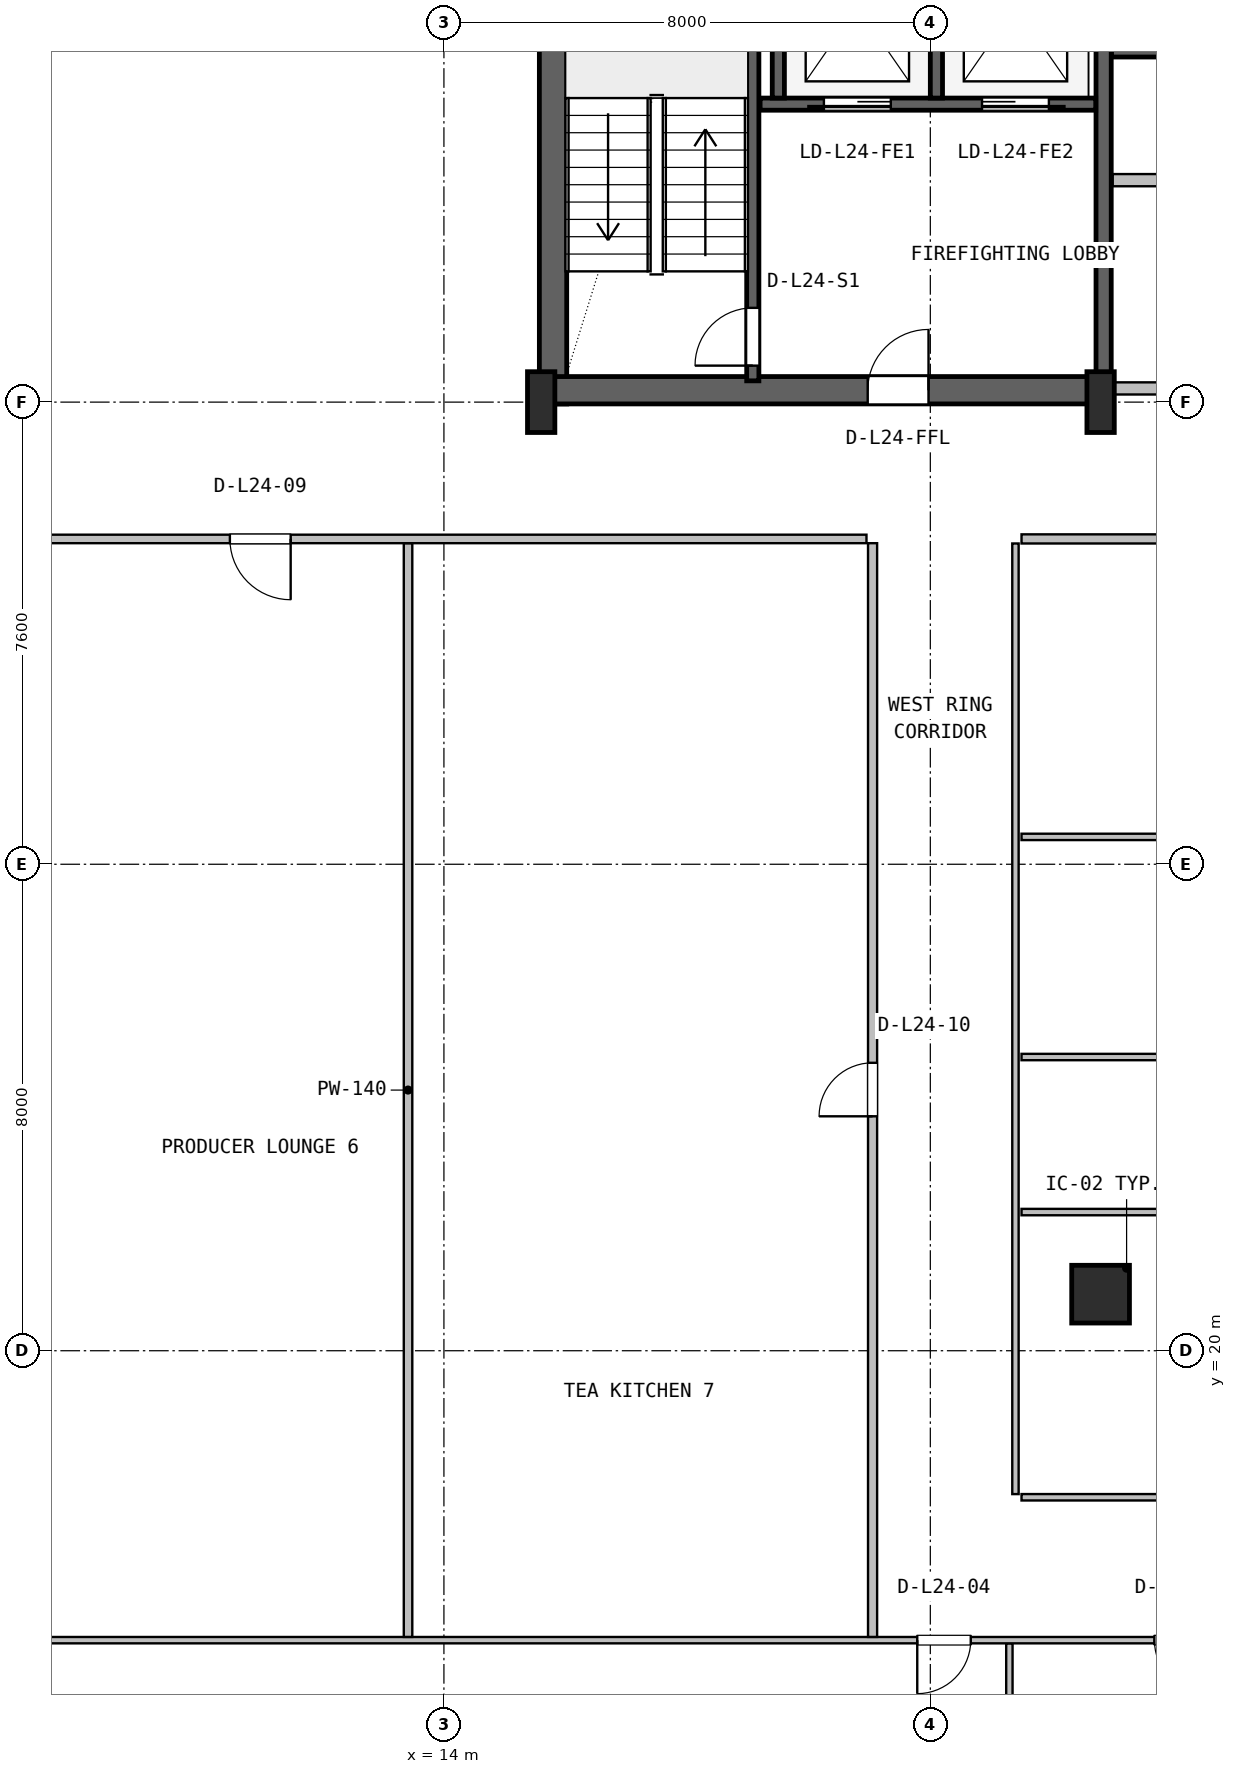
"""IFC4 building model, lengths in metres.
Left out: names, types, materials, properties, quantities, classifications, styles, units other than length and angle.
Written with IfcOpenShell. Run it as: python <this file> out.ifc"""

import sys

from ifc_helpers import new_model, si_unit, direction, frame, frame_2d, origin, origin_2d, place, context, subcontext, project, spatial, rectangle, i_section, extrude, source, transform, mapped, element, fill, save


model = new_model("IFC4")
c1 = context("Model", 3, precision=1e-05, world=origin(), true_north=direction((0.0, 1.0)))
c2 = subcontext(c1, "Body", "Model", "MODEL_VIEW")
j1 = project(units=[si_unit("LENGTHUNIT", "METRE"), si_unit("PLANEANGLEUNIT", "RADIAN")], contexts=[c1])
p1 = place(None, origin())
s1 = spatial("IfcSite", under=j1, at=p1, CompositionType="ELEMENT")
p2 = place(p1, origin())
s2 = spatial("IfcBuilding", under=s1, at=p2, CompositionType="ELEMENT")
p3 = place(p2, frame((0.0, 0.0, 103.0)))
s3 = spatial("IfcBuildingStorey", under=s2, at=p3, CompositionType="ELEMENT", Elevation=103.0)
p4 = place(p3, frame((15.795, 35.57, 0.0), z_axis=(0.0, 0.0, 1.0), x_axis=(0.0, 1.0, 0.0)))
e1 = element("IfcWall", 1, at=p4, inside=s3, PredefinedType="SHEAR", context=c2, shape_type="SweptSolid", body=[
    extrude(rectangle(XDim=11.23, YDim=0.45, at=frame_2d((5.615, 0.0))), origin(), (0.0, 0.0, 1.0), 3.55),
])
p5 = place(p3, frame((15.57, 35.795, 0.0), z_axis=(0.0, 0.0, 1.0), x_axis=(1.0, 0.0, 0.0)))
e2 = element("IfcWall", 2, at=p5, inside=s3, PredefinedType="SHEAR", context=c2, shape_type="SweptSolid", body=[
    extrude(rectangle(XDim=9.23, YDim=0.45, at=frame_2d((4.615, 0.0))), origin(), (0.0, 0.0, 1.0), 3.55),
])
p6 = place(p5, frame((5.4, 0.0, 0.0)))
e3 = element("IfcOpeningElement", 3, at=p6, cuts=e2, PredefinedType="OPENING", context=c2, shape_type="SweptSolid", body=[
    extrude(rectangle(XDim=1.0, YDim=2.1, at=frame_2d((0.5, 1.05))), frame((0.0, 0.235, 0.0), z_axis=(0.0, -1.0, 0.0), x_axis=(1.0, 0.0, 0.0)), (0.0, 0.0, 1.0), 0.47),
])
m1 = source(origin(), c2, "Body", "SweptSolid", [
    extrude(i_section(OverallWidth=0.45, OverallDepth=1.0, WebThickness=0.016, FlangeThickness=0.03, FilletRadius=0.016, at=origin_2d()), origin(), (0.0, 0.0, 1.0), 3.8),
])
for number, where, z_axis, x_axis in (
    (4, (15.6, 35.6, 0.0), (0.0, 0.0, 1.0), (1.0, 0.0, 0.0)),
    (5, (24.8, 35.6, 0.0), (0.0, 0.0, 1.0), (1.0, 0.0, 0.0)),
):
    element("IfcColumn", number, at=place(p3, frame(where, z_axis=z_axis, x_axis=x_axis)), inside=s3, PredefinedType="COLUMN", context=c2, shape_type="MappedRepresentation", body=[
        mapped(m1, transform((0.0, 0.0, 0.0), x_axis=(1.0, 0.0, 0.0), y_axis=(0.0, 1.0, 0.0), z_axis=(0.0, 0.0, 1.0), scale=1.0)),
    ])
m2 = source(origin(), c2, "Body", "SweptSolid", [
    extrude(rectangle(XDim=0.95, YDim=0.95, at=origin_2d()), origin(), (0.0, 0.0, 1.0), 3.8),
])
p7 = place(p3, frame((24.8, 20.93, 0.0), z_axis=(0.0, 0.0, 1.0), x_axis=(1.0, 0.0, 0.0)))
e6 = element("IfcColumn", 6, at=p7, inside=s3, PredefinedType="COLUMN", context=c2, shape_type="MappedRepresentation", body=[
    mapped(m2, transform((0.0, 0.0, 0.0), x_axis=(1.0, 0.0, 0.0), y_axis=(0.0, 1.0, 0.0), z_axis=(0.0, 0.0, 1.0), scale=1.0)),
])
p8 = place(p3, frame((19.08, 35.95, 0.0), z_axis=(0.0, 0.0, 1.0), x_axis=(0.0, 1.0, 0.0)))
e7 = element("IfcWall", 7, at=p8, inside=s3, PredefinedType="SHEAR", context=c2, shape_type="SweptSolid", body=[
    extrude(rectangle(XDim=9.65, YDim=0.2, at=frame_2d((4.825, 0.0))), origin(), (0.0, 0.0, 1.0), 3.55),
])
p9 = place(p8, frame((0.25, 0.0, 0.0)))
e8 = element("IfcOpeningElement", 8, at=p9, cuts=e7, PredefinedType="OPENING", context=c2, shape_type="SweptSolid", body=[
    extrude(rectangle(XDim=0.95, YDim=2.1, at=frame_2d((0.475, 1.05))), frame((0.0, 0.11, 0.0), z_axis=(0.0, -1.0, 0.0), x_axis=(1.0, 0.0, 0.0)), (0.0, 0.0, 1.0), 0.22),
])
p10 = place(p3, frame((24.85, 36.05, 0.0), z_axis=(0.0, 0.0, 1.0), x_axis=(0.0, 1.0, 0.0)))
e9 = element("IfcWall", 9, at=p10, inside=s3, PredefinedType="SHEAR", context=c2, shape_type="SweptSolid", body=[
    extrude(rectangle(XDim=10.45, YDim=0.25, at=frame_2d((5.225, 0.0))), origin(), (0.0, 0.0, 1.0), 3.55),
])
p11 = place(p3, frame((19.2, 40.5, 0.0), z_axis=(0.0, 0.0, 1.0), x_axis=(1.0, 0.0, 0.0)))
e10 = element("IfcWall", 10, at=p11, inside=s3, PredefinedType="SHEAR", context=c2, shape_type="SweptSolid", body=[
    extrude(rectangle(XDim=5.52, YDim=0.2, at=frame_2d((2.76, 0.0))), origin(), (0.0, 0.0, 1.0), 3.55),
])
p12 = place(p11, frame((1.05, 0.0, 0.0)))
e11 = element("IfcOpeningElement", 11, at=p12, cuts=e10, PredefinedType="OPENING", context=c2, shape_type="SweptSolid", body=[
    extrude(rectangle(XDim=1.1, YDim=2.18, at=frame_2d((0.55, 1.09))), frame((0.0, 0.11, 0.0), z_axis=(0.0, -1.0, 0.0), x_axis=(1.0, 0.0, 0.0)), (0.0, 0.0, 1.0), 0.22),
])
p13 = place(p11, frame((3.65, 0.0, 0.0)))
e12 = element("IfcOpeningElement", 12, at=p13, cuts=e10, PredefinedType="OPENING", context=c2, shape_type="SweptSolid", body=[
    extrude(rectangle(XDim=1.1, YDim=2.18, at=frame_2d((0.55, 1.09))), frame((0.0, 0.11, 0.0), z_axis=(0.0, -1.0, 0.0), x_axis=(1.0, 0.0, 0.0)), (0.0, 0.0, 1.0), 0.22),
])
p14 = place(p3, frame((22.1, 40.6, 0.0), z_axis=(0.0, 0.0, 1.0), x_axis=(0.0, 1.0, 0.0)))
e13 = element("IfcWall", 13, at=p14, inside=s3, PredefinedType="SHEAR", context=c2, shape_type="SweptSolid", body=[
    extrude(rectangle(XDim=3.0, YDim=0.2, at=frame_2d((1.5, 0.0))), origin(), (0.0, 0.0, 1.0), 3.55),
])
p15 = place(p3, frame((19.5, 40.6, 0.0), z_axis=(0.0, 0.0, 1.0), x_axis=(0.0, 1.0, 0.0)))
e14 = element("IfcWall", 14, at=p15, inside=s3, PredefinedType="SHEAR", context=c2, shape_type="SweptSolid", body=[
    extrude(rectangle(XDim=5.95, YDim=0.2, at=frame_2d((2.975, 0.0))), origin(), (0.0, 0.0, 1.0), 3.55),
])
p16 = place(p3, frame((24.98, 41.4, 0.0), z_axis=(0.0, 0.0, 1.0), x_axis=(1.0, 0.0, 0.0)))
e15 = element("IfcWall", 15, at=p16, inside=s3, PredefinedType="SHEAR", context=c2, shape_type="SweptSolid", body=[
    extrude(rectangle(XDim=23.82, YDim=0.25, at=frame_2d((11.91, 0.0))), origin(), (0.0, 0.0, 1.0), 3.55),
])
p17 = place(p16, frame((8.87, 0.0, 0.0)))
e16 = element("IfcOpeningElement", 16, at=p17, cuts=e15, PredefinedType="OPENING", context=c2, shape_type="SweptSolid", body=[
    extrude(rectangle(XDim=1.1, YDim=2.18, at=frame_2d((0.55, 1.09))), frame((0.0, 0.135, 0.0), z_axis=(0.0, -1.0, 0.0), x_axis=(1.0, 0.0, 0.0)), (0.0, 0.0, 1.0), 0.27),
])
p18 = place(p16, frame((11.47, 0.0, 0.0)))
e17 = element("IfcOpeningElement", 17, at=p18, cuts=e15, PredefinedType="OPENING", context=c2, shape_type="SweptSolid", body=[
    extrude(rectangle(XDim=1.1, YDim=2.18, at=frame_2d((0.55, 1.09))), frame((0.0, 0.135, 0.0), z_axis=(0.0, -1.0, 0.0), x_axis=(1.0, 0.0, 0.0)), (0.0, 0.0, 1.0), 0.27),
])
p19 = place(p16, frame((14.07, 0.0, 0.0)))
e18 = element("IfcOpeningElement", 18, at=p19, cuts=e15, PredefinedType="OPENING", context=c2, shape_type="SweptSolid", body=[
    extrude(rectangle(XDim=1.1, YDim=2.18, at=frame_2d((0.55, 1.09))), frame((0.0, 0.135, 0.0), z_axis=(0.0, -1.0, 0.0), x_axis=(1.0, 0.0, 0.0)), (0.0, 0.0, 1.0), 0.27),
])
p20 = place(p3, frame((25.0, 35.825, 0.0), z_axis=(0.0, 0.0, 1.0), x_axis=(1.0, 0.0, 0.0)))
e19 = element("IfcWall", 19, at=p20, inside=s3, PredefinedType="PLUMBINGWALL", context=c2, shape_type="SweptSolid", body=[
    extrude(rectangle(XDim=9.75, YDim=0.2, at=frame_2d((4.875, 0.0))), origin(), (0.0, 0.0, 1.0), 2.325),
])
p21 = place(p3, frame((25.0, 39.25, 0.0), z_axis=(0.0, 0.0, 1.0), x_axis=(1.0, 0.0, 0.0)))
e20 = element("IfcWall", 20, at=p21, inside=s3, PredefinedType="PLUMBINGWALL", context=c2, shape_type="SweptSolid", body=[
    extrude(rectangle(XDim=9.75, YDim=0.2, at=frame_2d((4.875, 0.0))), origin(), (0.0, 0.0, 1.0), 3.53),
])
p22 = place(p21, frame((1.75, 0.0, 0.0)))
e21 = element("IfcOpeningElement", 21, at=p22, cuts=e20, PredefinedType="OPENING", context=c2, shape_type="SweptSolid", body=[
    extrude(rectangle(XDim=0.9, YDim=2.06, at=frame_2d((0.45, 1.03))), frame((0.0, 0.11, 0.0), z_axis=(0.0, -1.0, 0.0), x_axis=(1.0, 0.0, 0.0)), (0.0, 0.0, 1.0), 0.22),
])
p23 = place(p21, frame((6.725, 0.0, 0.0)))
e22 = element("IfcOpeningElement", 22, at=p23, cuts=e20, PredefinedType="OPENING", context=c2, shape_type="SweptSolid", body=[
    extrude(rectangle(XDim=0.9, YDim=2.06, at=frame_2d((0.45, 1.03))), frame((0.0, 0.11, 0.0), z_axis=(0.0, -1.0, 0.0), x_axis=(1.0, 0.0, 0.0)), (0.0, 0.0, 1.0), 0.22),
])
p24 = place(p3, frame((23.3, 4.38, 0.0), z_axis=(0.0, 0.0, 1.0), x_axis=(0.0, 1.0, 0.0)))
e23 = element("IfcWall", 23, at=p24, inside=s3, PredefinedType="PARTITIONING", context=c2, shape_type="SweptSolid", body=[
    extrude(rectangle(XDim=10.808, YDim=0.105, at=frame_2d((5.404, 0.0))), origin(), (0.0, 0.0, 1.0), 3.108),
])
p25 = place(p3, frame((4.68, 15.24, 0.0), z_axis=(0.0, 0.0, 1.0), x_axis=(1.0, 0.0, 0.0)))
e24 = element("IfcWall", 24, at=p25, inside=s3, PredefinedType="PARTITIONING", context=c2, shape_type="SweptSolid", body=[
    extrude(rectangle(XDim=58.64, YDim=0.105, at=frame_2d((29.32, 0.0))), origin(), (0.0, 0.0, 1.0), 2.83),
])
p26 = place(p25, frame((17.105, 0.0, 0.0)))
e25 = element("IfcOpeningElement", 25, at=p26, cuts=e24, PredefinedType="OPENING", context=c2, shape_type="SweptSolid", body=[
    extrude(rectangle(XDim=0.88, YDim=2.06, at=frame_2d((0.44, 1.03))), frame((0.0, 0.062, 0.0), z_axis=(0.0, -1.0, 0.0), x_axis=(1.0, 0.0, 0.0)), (0.0, 0.0, 1.0), 0.125),
])
p27 = place(p25, frame((21.005, 0.0, 0.0)))
e26 = element("IfcOpeningElement", 26, at=p27, cuts=e24, PredefinedType="OPENING", context=c2, shape_type="SweptSolid", body=[
    extrude(rectangle(XDim=0.88, YDim=2.06, at=frame_2d((0.44, 1.03))), frame((0.0, 0.062, 0.0), z_axis=(0.0, -1.0, 0.0), x_axis=(1.0, 0.0, 0.0)), (0.0, 0.0, 1.0), 0.125),
])
p28 = place(p25, frame((27.42, 0.0, 0.0)))
e27 = element("IfcOpeningElement", 27, at=p28, cuts=e24, PredefinedType="OPENING", context=c2, shape_type="SweptSolid", body=[
    extrude(rectangle(XDim=0.88, YDim=2.06, at=frame_2d((0.44, 1.03))), frame((0.0, 0.062, 0.0), z_axis=(0.0, -1.0, 0.0), x_axis=(1.0, 0.0, 0.0)), (0.0, 0.0, 1.0), 0.125),
])
p29 = place(p25, frame((35.845, 0.0, 0.0)))
e28 = element("IfcOpeningElement", 28, at=p29, cuts=e24, PredefinedType="OPENING", context=c2, shape_type="SweptSolid", body=[
    extrude(rectangle(XDim=0.92, YDim=2.08, at=frame_2d((0.46, 1.04))), frame((0.0, 0.062, 0.0), z_axis=(0.0, -1.0, 0.0), x_axis=(1.0, 0.0, 0.0)), (0.0, 0.0, 1.0), 0.125),
])
p30 = place(p25, frame((41.71, 0.0, 0.0)))
e29 = element("IfcOpeningElement", 29, at=p30, cuts=e24, PredefinedType="OPENING", context=c2, shape_type="SweptSolid", body=[
    extrude(rectangle(XDim=1.05, YDim=2.1, at=frame_2d((0.525, 1.05))), frame((0.0, 0.062, 0.0), z_axis=(0.0, -1.0, 0.0), x_axis=(1.0, 0.0, 0.0)), (0.0, 0.0, 1.0), 0.125),
])
p31 = place(p3, frame((13.41, 15.293, 0.0), z_axis=(0.0, 0.0, 1.0), x_axis=(0.0, 1.0, 0.0)))
e30 = element("IfcWall", 30, at=p31, inside=s3, PredefinedType="PARTITIONING", context=c2, shape_type="SweptSolid", body=[
    extrude(rectangle(XDim=17.987, YDim=0.14, at=frame_2d((8.994, 0.0))), origin(), (0.0, 0.0, 1.0), 3.222),
])
p32 = place(p3, frame((4.68, 33.35, 0.0), z_axis=(0.0, 0.0, 1.0), x_axis=(1.0, 0.0, 0.0)))
e31 = element("IfcWall", 31, at=p32, inside=s3, PredefinedType="PARTITIONING", context=c2, shape_type="SweptSolid", body=[
    extrude(rectangle(XDim=16.27, YDim=0.14, at=frame_2d((8.135, 0.0))), origin(), (0.0, 0.0, 1.0), 3.108),
])
p33 = place(p32, frame((5.8, 0.0, 0.0)))
e32 = element("IfcOpeningElement", 32, at=p33, cuts=e31, PredefinedType="OPENING", context=c2, shape_type="SweptSolid", body=[
    extrude(rectangle(XDim=1.0, YDim=2.1, at=frame_2d((0.5, 1.05))), frame((0.0, 0.08, 0.0), z_axis=(0.0, -1.0, 0.0), x_axis=(1.0, 0.0, 0.0)), (0.0, 0.0, 1.0), 0.16),
])
p34 = place(p3, frame((21.05, 15.293, 0.0), z_axis=(0.0, 0.0, 1.0), x_axis=(0.0, 1.0, 0.0)))
e33 = element("IfcWall", 33, at=p34, inside=s3, PredefinedType="PARTITIONING", context=c2, shape_type="SweptSolid", body=[
    extrude(rectangle(XDim=17.987, YDim=0.15, at=frame_2d((8.994, 0.0))), origin(), (0.0, 0.0, 1.0), 3.222),
])
p35 = place(p34, frame((8.562, 0.0, 0.0)))
e34 = element("IfcOpeningElement", 34, at=p35, cuts=e33, PredefinedType="OPENING", context=c2, shape_type="SweptSolid", body=[
    extrude(rectangle(XDim=0.88, YDim=2.06, at=frame_2d((0.44, 1.03))), frame((0.0, 0.085, 0.0), z_axis=(0.0, -1.0, 0.0), x_axis=(1.0, 0.0, 0.0)), (0.0, 0.0, 1.0), 0.17),
])
p36 = place(p3, frame((23.5, 17.59, 0.0), z_axis=(0.0, 0.0, 1.0), x_axis=(1.0, 0.0, 0.0)))
e35 = element("IfcWall", 35, at=p36, inside=s3, PredefinedType="PARTITIONING", context=c2, shape_type="SweptSolid", body=[
    extrude(rectangle(XDim=22.14, YDim=0.105, at=frame_2d((11.07, 0.0))), origin(), (0.0, 0.0, 1.0), 2.83),
])
p37 = place(p36, frame((10.63, 0.0, 0.0)))
e36 = element("IfcOpeningElement", 36, at=p37, cuts=e35, PredefinedType="OPENING", context=c2, shape_type="SweptSolid", body=[
    extrude(rectangle(XDim=0.88, YDim=2.06, at=frame_2d((0.44, 1.03))), frame((0.0, 0.062, 0.0), z_axis=(0.0, -1.0, 0.0), x_axis=(1.0, 0.0, 0.0)), (0.0, 0.0, 1.0), 0.125),
])
p38 = place(p3, frame((23.5, 22.28, 0.0), z_axis=(0.0, 0.0, 1.0), x_axis=(1.0, 0.0, 0.0)))
e37 = element("IfcWall", 37, at=p38, inside=s3, PredefinedType="PARTITIONING", context=c2, shape_type="SweptSolid", body=[
    extrude(rectangle(XDim=22.14, YDim=0.105, at=frame_2d((11.07, 0.0))), origin(), (0.0, 0.0, 1.0), 2.83),
])
p39 = place(p3, frame((23.4, 17.642, 0.0), z_axis=(0.0, 0.0, 1.0), x_axis=(0.0, 1.0, 0.0)))
e38 = element("IfcWall", 38, at=p39, inside=s3, PredefinedType="PARTITIONING", context=c2, shape_type="SweptSolid", body=[
    extrude(rectangle(XDim=15.633, YDim=0.105, at=frame_2d((7.816, 0.0))), origin(), (0.0, 0.0, 1.0), 3.222),
])
for number, where, z_axis, x_axis in (
    (39, (23.5, 24.83, 0.0), (0.0, 0.0, 1.0), (1.0, 0.0, 0.0)),
    (40, (23.5, 28.45, 0.0), (0.0, 0.0, 1.0), (1.0, 0.0, 0.0)),
):
    element("IfcWall", number, at=place(p3, frame(where, z_axis=z_axis, x_axis=x_axis)), inside=s3, PredefinedType="PARTITIONING", context=c2, shape_type="SweptSolid", body=[
        extrude(rectangle(XDim=22.14, YDim=0.105, at=frame_2d((11.07, 0.0))), origin(), (0.0, 0.0, 1.0), 2.83),
    ])
p40 = place(p3, frame((23.5, 33.35, 0.0), z_axis=(0.0, 0.0, 1.0), x_axis=(1.0, 0.0, 0.0)))
e41 = element("IfcWall", 41, at=p40, inside=s3, PredefinedType="PARTITIONING", context=c2, shape_type="SweptSolid", body=[
    extrude(rectangle(XDim=22.14, YDim=0.15, at=frame_2d((11.07, 0.0))), origin(), (0.0, 0.0, 1.0), 2.83),
])
p41 = place(p40, frame((10.61, 0.0, 0.0)))
e42 = element("IfcOpeningElement", 42, at=p41, cuts=e41, PredefinedType="OPENING", context=c2, shape_type="SweptSolid", body=[
    extrude(rectangle(XDim=0.92, YDim=2.08, at=frame_2d((0.46, 1.04))), frame((0.0, 0.085, 0.0), z_axis=(0.0, -1.0, 0.0), x_axis=(1.0, 0.0, 0.0)), (0.0, 0.0, 1.0), 0.17),
])
m3 = source(origin(), c2, "Body", "SweptSolid", [
    extrude(rectangle(XDim=0.95, YDim=2.1, at=frame_2d((0.475, 1.05))), frame((0.0, 0.025, 0.0), z_axis=(0.0, -1.0, 0.0), x_axis=(1.0, 0.0, 0.0)), (0.0, 0.0, 1.0), 0.05),
])
p42 = place(p9, origin())
e43 = element("IfcDoor", 43, at=p42, inside=s3, OperationType="SINGLE_SWING_LEFT", PredefinedType="DOOR", context=c2, shape_type="MappedRepresentation", body=[
    mapped(m3, transform((0.0, 0.0, 0.0), x_axis=(1.0, 0.0, 0.0), y_axis=(0.0, 1.0, 0.0), z_axis=(0.0, 0.0, 1.0), scale=1.0)),
])
fill(e8, e43)
m4 = source(origin(), c2, "Body", "SweptSolid", [
    extrude(rectangle(XDim=1.0, YDim=2.1, at=frame_2d((0.5, 1.05))), frame((0.0, 0.025, 0.0), z_axis=(0.0, -1.0, 0.0), x_axis=(1.0, 0.0, 0.0)), (0.0, 0.0, 1.0), 0.05),
])
p43 = place(p6, origin())
e44 = element("IfcDoor", 44, at=p43, inside=s3, OperationType="SINGLE_SWING_RIGHT", PredefinedType="DOOR", context=c2, shape_type="MappedRepresentation", body=[
    mapped(m4, transform((0.0, 0.0, 0.0), x_axis=(1.0, 0.0, 0.0), y_axis=(0.0, 1.0, 0.0), z_axis=(0.0, 0.0, 1.0), scale=1.0)),
])
fill(e3, e44)
m5 = source(origin(), c2, "Body", "SweptSolid", [
    extrude(rectangle(XDim=1.1, YDim=2.18, at=frame_2d((0.55, 1.09))), frame((0.0, 0.025, 0.0), z_axis=(0.0, -1.0, 0.0), x_axis=(1.0, 0.0, 0.0)), (0.0, 0.0, 1.0), 0.05),
])
p44 = place(p12, frame((1.1, 0.0, 0.0), z_axis=(0.0, 0.0, 1.0), x_axis=(-1.0, 0.0, 0.0)))
e45 = element("IfcDoor", 45, at=p44, inside=s3, OperationType="SLIDING_TO_LEFT", PredefinedType="DOOR", context=c2, shape_type="MappedRepresentation", body=[
    mapped(m5, transform((0.0, 0.0, 0.0), x_axis=(1.0, 0.0, 0.0), y_axis=(0.0, 1.0, 0.0), z_axis=(0.0, 0.0, 1.0), scale=1.0)),
])
fill(e11, e45)
p45 = place(p13, frame((1.1, 0.0, 0.0), z_axis=(0.0, 0.0, 1.0), x_axis=(-1.0, 0.0, 0.0)))
e46 = element("IfcDoor", 46, at=p45, inside=s3, OperationType="SLIDING_TO_RIGHT", PredefinedType="DOOR", context=c2, shape_type="MappedRepresentation", body=[
    mapped(m5, transform((0.0, 0.0, 0.0), x_axis=(1.0, 0.0, 0.0), y_axis=(0.0, 1.0, 0.0), z_axis=(0.0, 0.0, 1.0), scale=1.0)),
])
fill(e12, e46)
m6 = source(origin(), c2, "Body", "SweptSolid", [
    extrude(rectangle(XDim=0.88, YDim=2.06, at=frame_2d((0.44, 1.03))), frame((0.0, 0.025, 0.0), z_axis=(0.0, -1.0, 0.0), x_axis=(1.0, 0.0, 0.0)), (0.0, 0.0, 1.0), 0.05),
])
p46 = place(p26, frame((0.88, 0.0, 0.0), z_axis=(0.0, 0.0, 1.0), x_axis=(-1.0, 0.0, 0.0)))
e47 = element("IfcDoor", 47, at=p46, inside=s3, OperationType="SINGLE_SWING_LEFT", PredefinedType="DOOR", context=c2, shape_type="MappedRepresentation", body=[
    mapped(m6, transform((0.0, 0.0, 0.0), x_axis=(1.0, 0.0, 0.0), y_axis=(0.0, 1.0, 0.0), z_axis=(0.0, 0.0, 1.0), scale=1.0)),
])
fill(e25, e47)
p47 = place(p27, frame((0.88, 0.0, 0.0), z_axis=(0.0, 0.0, 1.0), x_axis=(-1.0, 0.0, 0.0)))
e48 = element("IfcDoor", 48, at=p47, inside=s3, OperationType="SINGLE_SWING_RIGHT", PredefinedType="DOOR", context=c2, shape_type="MappedRepresentation", body=[
    mapped(m6, transform((0.0, 0.0, 0.0), x_axis=(1.0, 0.0, 0.0), y_axis=(0.0, 1.0, 0.0), z_axis=(0.0, 0.0, 1.0), scale=1.0)),
])
fill(e26, e48)
m7 = source(origin(), c2, "Body", "SweptSolid", [
    extrude(rectangle(XDim=1.0, YDim=2.1, at=frame_2d((0.5, 1.05))), frame((0.0, 0.025, 0.0), z_axis=(0.0, -1.0, 0.0), x_axis=(1.0, 0.0, 0.0)), (0.0, 0.0, 1.0), 0.05),
])
p48 = place(p33, frame((1.0, 0.0, 0.0), z_axis=(0.0, 0.0, 1.0), x_axis=(-1.0, 0.0, 0.0)))
e49 = element("IfcDoor", 49, at=p48, inside=s3, OperationType="SINGLE_SWING_RIGHT", PredefinedType="DOOR", context=c2, shape_type="MappedRepresentation", body=[
    mapped(m7, transform((0.0, 0.0, 0.0), x_axis=(1.0, 0.0, 0.0), y_axis=(0.0, 1.0, 0.0), z_axis=(0.0, 0.0, 1.0), scale=1.0)),
])
fill(e32, e49)
p49 = place(p35, origin())
e50 = element("IfcDoor", 50, at=p49, inside=s3, OperationType="SINGLE_SWING_LEFT", PredefinedType="DOOR", context=c2, shape_type="MappedRepresentation", body=[
    mapped(m6, transform((0.0, 0.0, 0.0), x_axis=(1.0, 0.0, 0.0), y_axis=(0.0, 1.0, 0.0), z_axis=(0.0, 0.0, 1.0), scale=1.0)),
])
fill(e34, e50)
save(model, sys.argv[1])
